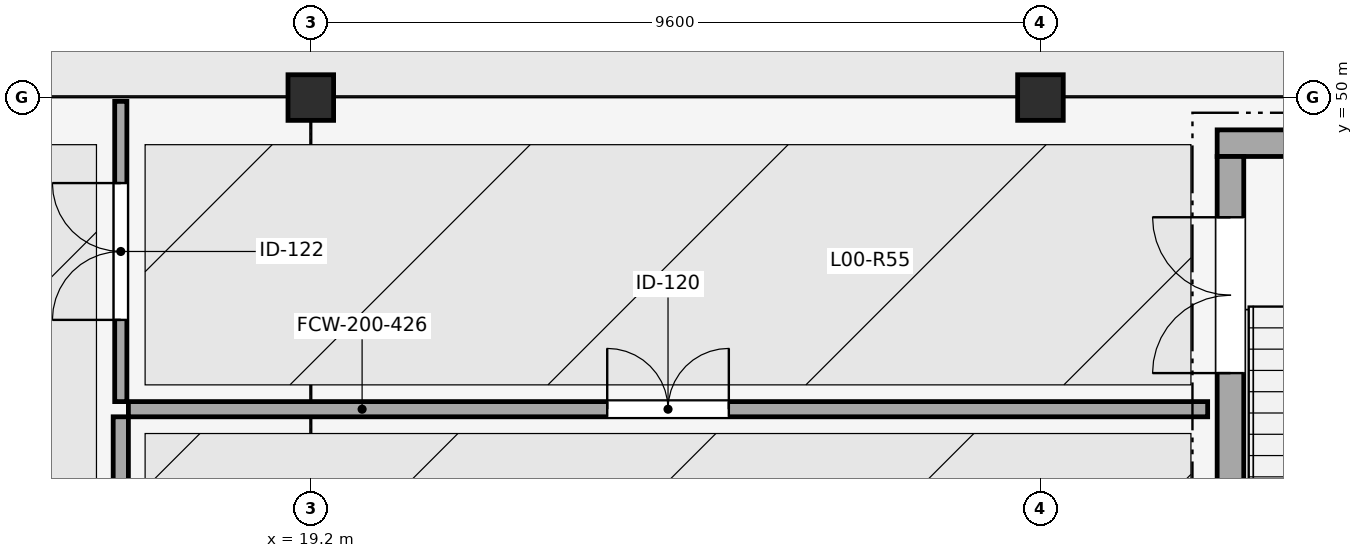
"""IFC4 building model, lengths in metres.
Left out: names, types, materials, properties, quantities, classifications, styles, units other than length and angle.
Written with IfcOpenShell. Run it as: python <this file> out.ifc"""

import sys

from ifc_helpers import new_model, si_unit, direction, frame, frame_2d, origin, origin_2d, place, context, subcontext, project, spatial, rectangle, extrude, element, fill, save


model = new_model("IFC4")
c1 = context("Model", 3, precision=1e-05, world=origin(), true_north=direction((0.0, 1.0)))
c2 = subcontext(c1, "Body", "Model", "MODEL_VIEW")
j1 = project(units=[si_unit("LENGTHUNIT", "METRE"), si_unit("PLANEANGLEUNIT", "RADIAN")], contexts=[c1])
p1 = place(None, origin())
s1 = spatial("IfcSite", under=j1, at=p1, CompositionType="ELEMENT")
p2 = place(p1, origin())
s2 = spatial("IfcBuilding", under=s1, at=p2, CompositionType="ELEMENT")
p3 = place(p2, origin())
s3 = spatial("IfcBuildingStorey", under=s2, at=p3, CompositionType="ELEMENT", Elevation=0.0)
for number, where, z_axis, x_axis in (
    (1, (19.2, 50.0, 0.0), (0.0, 0.0, 1.0), (1.0, 0.0, 0.0)),
    (2, (28.8, 50.0, 0.0), (0.0, 0.0, 1.0), (1.0, 0.0, 0.0)),
):
    element("IfcColumn", number, at=place(p3, frame(where, z_axis=z_axis, x_axis=x_axis)), inside=s3, PredefinedType="COLUMN", context=c2, shape_type="SweptSolid", body=[
        extrude(rectangle(XDim=0.6, YDim=0.6, at=origin_2d()), origin(), (0.0, 0.0, 1.0), 4.8),
    ])
p4 = place(p3, frame((31.125, 49.4, 0.0), z_axis=(0.0, 0.0, 1.0), x_axis=(1.0, 0.0, 0.0)))
e3 = element("IfcWall", 3, at=p4, inside=s3, PredefinedType="SHEAR", context=c2, shape_type="SweptSolid", body=[
    extrude(rectangle(XDim=5.65, YDim=0.35, at=frame_2d((2.825, 0.0))), origin(), (0.0, 0.0, 1.0), 4.55),
])
p5 = place(p3, frame((31.3, 41.275, 0.0), z_axis=(0.0, 0.0, 1.0), x_axis=(0.0, 1.0, 0.0)))
e4 = element("IfcWall", 4, at=p5, inside=s3, PredefinedType="SHEAR", context=c2, shape_type="SweptSolid", body=[
    extrude(rectangle(XDim=7.95, YDim=0.35, at=frame_2d((3.975, 0.0))), origin(), (0.0, 0.0, 1.0), 4.55),
])
p6 = place(p5, frame((5.1, 0.0, 0.0)))
e5 = element("IfcOpeningElement", 5, at=p6, cuts=e4, PredefinedType="OPENING", context=c2, shape_type="SweptSolid", body=[
    extrude(rectangle(XDim=2.05, YDim=2.15, at=frame_2d((1.025, 1.075))), frame((0.0, 0.185, 0.0), z_axis=(0.0, -1.0, 0.0), x_axis=(1.0, 0.0, 0.0)), (0.0, 0.0, 1.0), 0.37),
])
p7 = place(p3, frame((16.7, 28.5, 0.0), z_axis=(0.0, 0.0, 1.0), x_axis=(0.0, 1.0, 0.0)))
e6 = element("IfcWall", 6, at=p7, inside=s3, PredefinedType="PARTITIONING", context=c2, shape_type="SweptSolid", body=[
    extrude(rectangle(XDim=17.3, YDim=0.2, at=frame_2d((8.65, 0.0))), origin(), (0.0, 0.0, 1.0), 4.42),
])
p8 = place(p7, frame((7.85, 0.0, 0.0)))
e7 = element("IfcOpeningElement", 7, at=p8, cuts=e6, PredefinedType="OPENING", context=c2, shape_type="SweptSolid", body=[
    extrude(rectangle(XDim=1.6, YDim=2.15, at=frame_2d((0.8, 1.075))), frame((0.0, 0.11, 0.0), z_axis=(0.0, -1.0, 0.0), x_axis=(1.0, 0.0, 0.0)), (0.0, 0.0, 1.0), 0.22),
])
p9 = place(p3, frame((16.8, 45.9, 0.0), z_axis=(0.0, 0.0, 1.0), x_axis=(1.0, 0.0, 0.0)))
e8 = element("IfcWall", 8, at=p9, inside=s3, PredefinedType="PARTITIONING", context=c2, shape_type="SweptSolid", body=[
    extrude(rectangle(XDim=14.2, YDim=0.2, at=frame_2d((7.1, 0.0))), origin(), (0.0, 0.0, 1.0), 4.42),
])
p10 = place(p9, frame((6.3, 0.0, 0.0)))
e9 = element("IfcOpeningElement", 9, at=p10, cuts=e8, PredefinedType="OPENING", context=c2, shape_type="SweptSolid", body=[
    extrude(rectangle(XDim=1.6, YDim=2.15, at=frame_2d((0.8, 1.075))), frame((0.0, 0.11, 0.0), z_axis=(0.0, -1.0, 0.0), x_axis=(1.0, 0.0, 0.0)), (0.0, 0.0, 1.0), 0.22),
])
p11 = place(p3, frame((16.7, 46.0, 0.0), z_axis=(0.0, 0.0, 1.0), x_axis=(0.0, 1.0, 0.0)))
e10 = element("IfcWall", 10, at=p11, inside=s3, PredefinedType="PARTITIONING", context=c2, shape_type="SweptSolid", body=[
    extrude(rectangle(XDim=3.95, YDim=0.16, at=frame_2d((1.975, 0.0))), origin(), (0.0, 0.0, 1.0), 4.42),
])
p12 = place(p11, frame((1.075, 0.0, 0.0)))
e11 = element("IfcOpeningElement", 11, at=p12, cuts=e10, PredefinedType="OPENING", context=c2, shape_type="SweptSolid", body=[
    extrude(rectangle(XDim=1.8, YDim=2.15, at=frame_2d((0.9, 1.075))), frame((0.0, 0.09, 0.0), z_axis=(0.0, -1.0, 0.0), x_axis=(1.0, 0.0, 0.0)), (0.0, 0.0, 1.0), 0.18),
])
p13 = place(p6, origin())
e12 = element("IfcDoor", 12, at=p13, inside=s3, OperationType="DOUBLE_DOOR_SINGLE_SWING", PredefinedType="DOOR", context=c2, shape_type="SweptSolid", body=[
    extrude(rectangle(XDim=2.05, YDim=2.15, at=frame_2d((1.025, 1.075))), frame((0.0, 0.025, 0.0), z_axis=(0.0, -1.0, 0.0), x_axis=(1.0, 0.0, 0.0)), (0.0, 0.0, 1.0), 0.05),
])
fill(e5, e12)
p14 = place(p10, origin())
e13 = element("IfcDoor", 13, at=p14, inside=s3, OperationType="DOUBLE_DOOR_SINGLE_SWING", PredefinedType="DOOR", context=c2, shape_type="SweptSolid", body=[
    extrude(rectangle(XDim=1.6, YDim=2.15, at=frame_2d((0.8, 1.075))), frame((0.0, 0.025, 0.0), z_axis=(0.0, -1.0, 0.0), x_axis=(1.0, 0.0, 0.0)), (0.0, 0.0, 1.0), 0.05),
])
fill(e9, e13)
p15 = place(p12, origin())
e14 = element("IfcDoor", 14, at=p15, inside=s3, OperationType="DOUBLE_DOOR_SINGLE_SWING", PredefinedType="DOOR", context=c2, shape_type="SweptSolid", body=[
    extrude(rectangle(XDim=1.8, YDim=2.15, at=frame_2d((0.9, 1.075))), frame((0.0, 0.025, 0.0), z_axis=(0.0, -1.0, 0.0), x_axis=(1.0, 0.0, 0.0)), (0.0, 0.0, 1.0), 0.05),
])
fill(e11, e14)
save(model, sys.argv[1])
